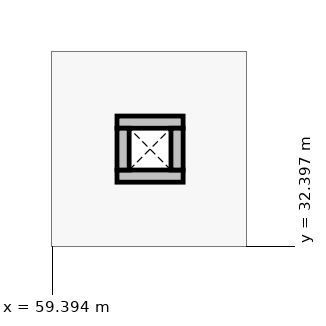
"""IFC4 building model, lengths in metres.
Left out: names, types, materials, properties, quantities, classifications, styles, units other than length and angle.
Written with IfcOpenShell. Run it as: python <this file> out.ifc"""

import sys

from ifc_helpers import new_model, si_unit, direction, frame, frame_2d, origin, place, context, subcontext, project, spatial, rectangle, extrude, element, save


model = new_model("IFC4")
c1 = context("Model", 3, precision=1e-05, world=origin(), true_north=direction((0.0, 1.0)))
c2 = subcontext(c1, "Body", "Model", "MODEL_VIEW")
j1 = project(units=[si_unit("LENGTHUNIT", "METRE"), si_unit("PLANEANGLEUNIT", "RADIAN")], contexts=[c1])
p1 = place(None, origin())
s1 = spatial("IfcSite", under=j1, at=p1, CompositionType="ELEMENT")
p2 = place(p1, origin())
s2 = spatial("IfcBuilding", under=s1, at=p2, CompositionType="ELEMENT")
p3 = place(p2, frame((0.0, 0.0, 4.8)))
s3 = spatial("IfcBuildingStorey", under=s2, at=p3, CompositionType="ELEMENT", Elevation=4.8)
for number, where, z_axis, x_axis in (
    (1, (60.24, 33.32, 0.0), (0.0, 0.0, 1.0), (1.0, 0.0, 0.0)),
    (2, (60.24, 34.03, 0.0), (0.0, 0.0, 1.0), (1.0, 0.0, 0.0)),
):
    element("IfcWall", number, at=place(p3, frame(where, z_axis=z_axis, x_axis=x_axis)), inside=s3, PredefinedType="PARTITIONING", context=c2, shape_type="SweptSolid", body=[
        extrude(rectangle(XDim=0.87, YDim=0.16, at=frame_2d((0.435, 0.0))), origin(), (0.0, 0.0, 1.0), 3.35),
    ])
for number, where, z_axis, x_axis in (
    (3, (60.32, 33.4, 0.0), (0.0, 0.0, 1.0), (0.0, 1.0, 0.0)),
    (4, (61.03, 33.4, 0.0), (0.0, 0.0, 1.0), (0.0, 1.0, 0.0)),
):
    element("IfcWall", number, at=place(p3, frame(where, z_axis=z_axis, x_axis=x_axis)), inside=s3, PredefinedType="PARTITIONING", context=c2, shape_type="SweptSolid", body=[
        extrude(rectangle(XDim=0.55, YDim=0.16, at=frame_2d((0.275, 0.0))), origin(), (0.0, 0.0, 1.0), 3.35),
    ])
save(model, sys.argv[1])
